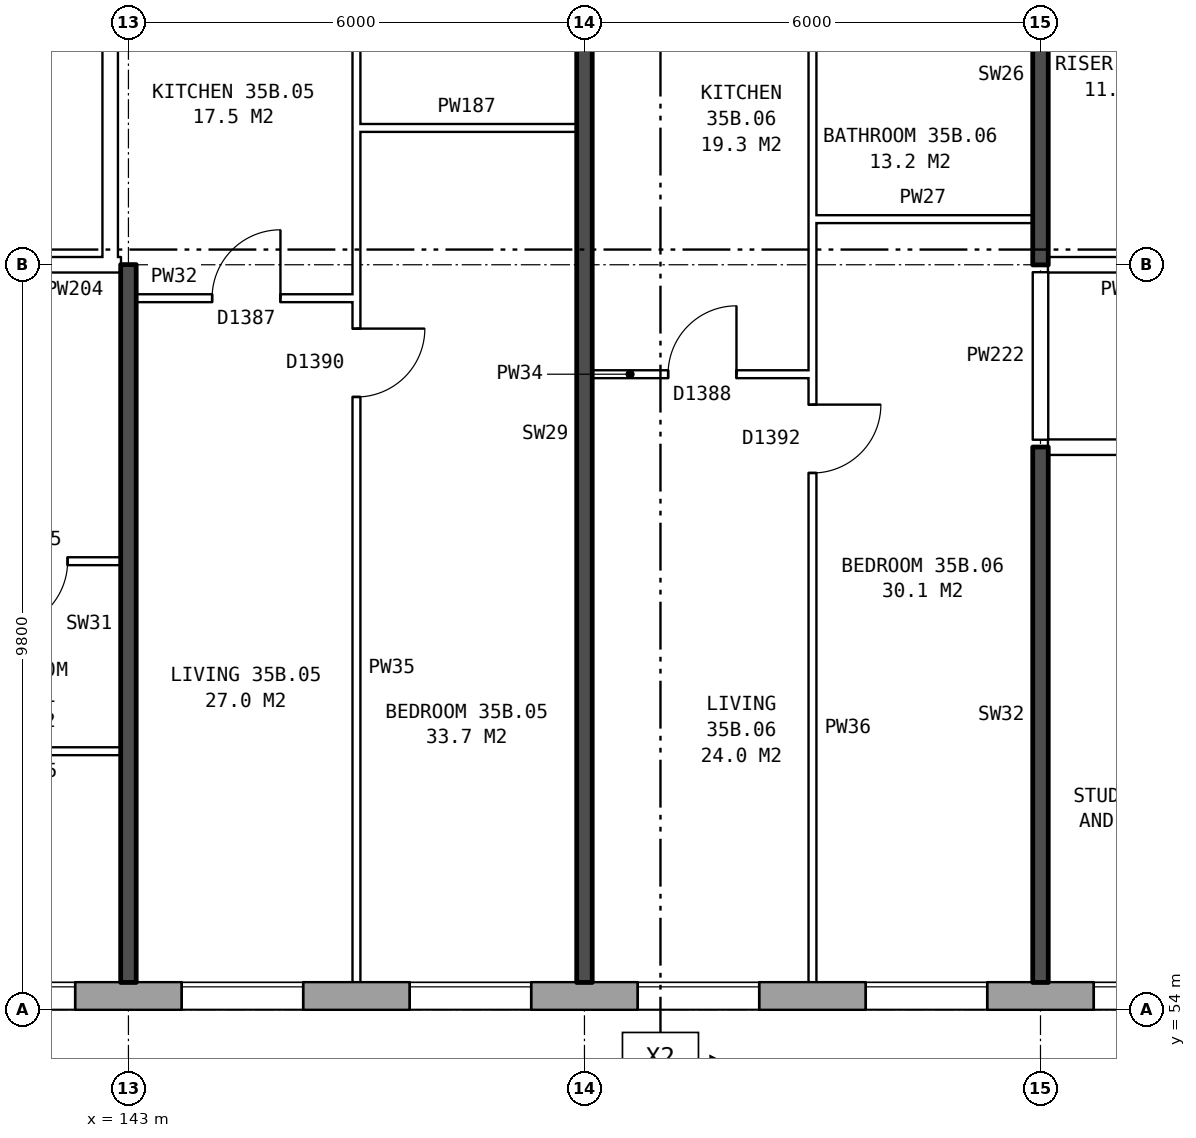
"""IFC4 building model, lengths in metres.
Left out: names, types, materials, properties, quantities, classifications, styles, units other than length and angle.
Written with IfcOpenShell. Run it as: python <this file> out.ifc"""

import sys

from ifc_helpers import new_model, si_unit, direction, frame, frame_2d, origin, place, context, subcontext, project, spatial, rectangle, extrude, element, fill, save


model = new_model("IFC4")
c1 = context("Model", 3, precision=1e-05, world=origin(), true_north=direction((0.0, 1.0)))
c2 = subcontext(c1, "Body", "Model", "MODEL_VIEW")
j1 = project(units=[si_unit("LENGTHUNIT", "METRE"), si_unit("PLANEANGLEUNIT", "RADIAN")], contexts=[c1])
p1 = place(None, origin())
s1 = spatial("IfcSite", under=j1, at=p1, CompositionType="ELEMENT")
p2 = place(p1, origin())
s2 = spatial("IfcBuilding", under=s1, at=p2, CompositionType="ELEMENT")
p3 = place(p2, frame((0.0, 0.0, 126.8)))
s3 = spatial("IfcBuildingStorey", under=s2, at=p3, CompositionType="ELEMENT", Elevation=126.8)
p4 = place(p3, frame((134.075, 54.18, 0.0), z_axis=(0.0, 0.0, 1.0), x_axis=(1.0, 0.0, 0.0)))
e1 = element("IfcWall", 1, at=p4, inside=s3, PredefinedType="STANDARD", context=c2, shape_type="SweptSolid", body=[
    extrude(rectangle(XDim=35.601, YDim=0.36, at=frame_2d((17.8, 0.0))), origin(), (0.0, 0.0, 1.0), 2.85),
])
p5 = place(p4, frame((0.625, 0.0, 0.8)))
e2 = element("IfcOpeningElement", 2, at=p5, cuts=e1, PredefinedType="OPENING", context=c2, shape_type="SweptSolid", body=[
    extrude(rectangle(XDim=1.6, YDim=1.8, at=frame_2d((0.8, 0.9))), frame((0.0, 0.19, 0.0), z_axis=(0.0, -1.0, 0.0), x_axis=(1.0, 0.0, 0.0)), (0.0, 0.0, 1.0), 0.38),
])
p6 = place(p4, frame((3.125, 0.0, 0.8)))
e3 = element("IfcOpeningElement", 3, at=p6, cuts=e1, PredefinedType="OPENING", context=c2, shape_type="SweptSolid", body=[
    extrude(rectangle(XDim=0.8, YDim=1.8, at=frame_2d((0.4, 0.9))), frame((0.0, 0.19, 0.0), z_axis=(0.0, -1.0, 0.0), x_axis=(1.0, 0.0, 0.0)), (0.0, 0.0, 1.0), 0.38),
])
p7 = place(p4, frame((6.625, 0.0, 0.8)))
e4 = element("IfcOpeningElement", 4, at=p7, cuts=e1, PredefinedType="OPENING", context=c2, shape_type="SweptSolid", body=[
    extrude(rectangle(XDim=1.6, YDim=1.8, at=frame_2d((0.8, 0.9))), frame((0.0, 0.19, 0.0), z_axis=(0.0, -1.0, 0.0), x_axis=(1.0, 0.0, 0.0)), (0.0, 0.0, 1.0), 0.38),
])
p8 = place(p4, frame((9.625, 0.0, 0.8)))
e5 = element("IfcOpeningElement", 5, at=p8, cuts=e1, PredefinedType="OPENING", context=c2, shape_type="SweptSolid", body=[
    extrude(rectangle(XDim=1.6, YDim=1.8, at=frame_2d((0.8, 0.9))), frame((0.0, 0.19, 0.0), z_axis=(0.0, -1.0, 0.0), x_axis=(1.0, 0.0, 0.0)), (0.0, 0.0, 1.0), 0.38),
])
p9 = place(p4, frame((12.625, 0.0, 0.8)))
e6 = element("IfcOpeningElement", 6, at=p9, cuts=e1, PredefinedType="OPENING", context=c2, shape_type="SweptSolid", body=[
    extrude(rectangle(XDim=1.6, YDim=1.8, at=frame_2d((0.8, 0.9))), frame((0.0, 0.19, 0.0), z_axis=(0.0, -1.0, 0.0), x_axis=(1.0, 0.0, 0.0)), (0.0, 0.0, 1.0), 0.38),
])
p10 = place(p4, frame((15.625, 0.0, 0.8)))
e7 = element("IfcOpeningElement", 7, at=p10, cuts=e1, PredefinedType="OPENING", context=c2, shape_type="SweptSolid", body=[
    extrude(rectangle(XDim=1.6, YDim=1.8, at=frame_2d((0.8, 0.9))), frame((0.0, 0.19, 0.0), z_axis=(0.0, -1.0, 0.0), x_axis=(1.0, 0.0, 0.0)), (0.0, 0.0, 1.0), 0.38),
])
p11 = place(p4, frame((18.625, 0.0, 0.8)))
e8 = element("IfcOpeningElement", 8, at=p11, cuts=e1, PredefinedType="OPENING", context=c2, shape_type="SweptSolid", body=[
    extrude(rectangle(XDim=1.6, YDim=1.8, at=frame_2d((0.8, 0.9))), frame((0.0, 0.19, 0.0), z_axis=(0.0, -1.0, 0.0), x_axis=(1.0, 0.0, 0.0)), (0.0, 0.0, 1.0), 0.38),
])
p12 = place(p4, frame((21.625, 0.0, 0.8)))
e9 = element("IfcOpeningElement", 9, at=p12, cuts=e1, PredefinedType="OPENING", context=c2, shape_type="SweptSolid", body=[
    extrude(rectangle(XDim=1.6, YDim=1.8, at=frame_2d((0.8, 0.9))), frame((0.0, 0.19, 0.0), z_axis=(0.0, -1.0, 0.0), x_axis=(1.0, 0.0, 0.0)), (0.0, 0.0, 1.0), 0.38),
])
p13 = place(p4, frame((24.625, 0.0, 0.8)))
e10 = element("IfcOpeningElement", 10, at=p13, cuts=e1, PredefinedType="OPENING", context=c2, shape_type="SweptSolid", body=[
    extrude(rectangle(XDim=1.6, YDim=1.8, at=frame_2d((0.8, 0.9))), frame((0.0, 0.19, 0.0), z_axis=(0.0, -1.0, 0.0), x_axis=(1.0, 0.0, 0.0)), (0.0, 0.0, 1.0), 0.38),
])
p14 = place(p4, frame((27.125, 0.0, 0.8)))
e11 = element("IfcOpeningElement", 11, at=p14, cuts=e1, PredefinedType="OPENING", context=c2, shape_type="SweptSolid", body=[
    extrude(rectangle(XDim=1.6, YDim=1.8, at=frame_2d((0.8, 0.9))), frame((0.0, 0.19, 0.0), z_axis=(0.0, -1.0, 0.0), x_axis=(1.0, 0.0, 0.0)), (0.0, 0.0, 1.0), 0.38),
])
p15 = place(p4, frame((29.025, 0.0, 0.8)))
e12 = element("IfcOpeningElement", 12, at=p15, cuts=e1, PredefinedType="OPENING", context=c2, shape_type="SweptSolid", body=[
    extrude(rectangle(XDim=0.6, YDim=0.9, at=frame_2d((0.3, 0.45))), frame((0.0, 0.19, 0.0), z_axis=(0.0, -1.0, 0.0), x_axis=(1.0, 0.0, 0.0)), (0.0, 0.0, 1.0), 0.38),
])
p16 = place(p4, frame((33.625, 0.0, 0.8)))
e13 = element("IfcOpeningElement", 13, at=p16, cuts=e1, PredefinedType="OPENING", context=c2, shape_type="SweptSolid", body=[
    extrude(rectangle(XDim=1.6, YDim=1.8, at=frame_2d((0.8, 0.9))), frame((0.0, 0.19, 0.0), z_axis=(0.0, -1.0, 0.0), x_axis=(1.0, 0.0, 0.0)), (0.0, 0.0, 1.0), 0.38),
])
p17 = place(p4, frame((4.225, 0.0, 1.6)))
e14 = element("IfcOpeningElement", 14, at=p17, cuts=e1, PredefinedType="OPENING", context=c2, shape_type="SweptSolid", body=[
    extrude(rectangle(XDim=0.6, YDim=0.9, at=frame_2d((0.3, 0.45))), frame((0.0, 0.19, 0.0), z_axis=(0.0, -1.0, 0.0), x_axis=(1.0, 0.0, 0.0)), (0.0, 0.0, 1.0), 0.38),
])
p18 = place(p4, frame((30.675, 0.0, 1.7)))
e15 = element("IfcOpeningElement", 15, at=p18, cuts=e1, PredefinedType="OPENING", context=c2, shape_type="SweptSolid", body=[
    extrude(rectangle(XDim=0.6, YDim=0.9, at=frame_2d((0.3, 0.45))), frame((0.0, 0.19, 0.0), z_axis=(0.0, -1.0, 0.0), x_axis=(1.0, 0.0, 0.0)), (0.0, 0.0, 1.0), 0.38),
])
p19 = place(p4, frame((31.575, 0.0, 0.8)))
e16 = element("IfcOpeningElement", 16, at=p19, cuts=e1, PredefinedType="OPENING", context=c2, shape_type="SweptSolid", body=[
    extrude(rectangle(XDim=1.0, YDim=1.8, at=frame_2d((0.5, 0.9))), frame((0.0, 0.19, 0.0), z_axis=(0.0, -1.0, 0.0), x_axis=(1.0, 0.0, 0.0)), (0.0, 0.0, 1.0), 0.38),
])
p20 = place(p3, frame((142.76, 63.9, 0.0), z_axis=(0.0, 0.0, 1.0), x_axis=(0.0, 1.0, 0.0)))
e17 = element("IfcWall", 17, at=p20, inside=s3, PredefinedType="PARTITIONING", context=c2, shape_type="SweptSolid", body=[
    extrude(rectangle(XDim=12.2, YDim=0.2, at=frame_2d((6.1, 0.0))), origin(), (0.0, 0.0, 1.0), 2.85),
])
p21 = place(p20, frame((5.1, 0.0, 0.0)))
e18 = element("IfcOpeningElement", 18, at=p21, cuts=e17, PredefinedType="OPENING", context=c2, shape_type="SweptSolid", body=[
    extrude(rectangle(XDim=2.0, YDim=2.1, at=frame_2d((1.0, 1.05))), frame((0.0, 0.11, 0.0), z_axis=(0.0, -1.0, 0.0), x_axis=(1.0, 0.0, 0.0)), (0.0, 0.0, 1.0), 0.22),
])
p22 = place(p3, frame((140.6, 57.4, 0.0), z_axis=(0.0, 0.0, 1.0), x_axis=(1.0, 0.0, 0.0)))
e19 = element("IfcWall", 19, at=p22, inside=s3, PredefinedType="PARTITIONING", context=c2, shape_type="SweptSolid", body=[
    extrude(rectangle(XDim=2.3, YDim=0.1, at=frame_2d((1.15, 0.0))), origin(), (0.0, 0.0, 1.0), 2.85),
])
p23 = place(p3, frame((137.1, 59.9, 0.0), z_axis=(0.0, 0.0, 1.0), x_axis=(1.0, 0.0, 0.0)))
e20 = element("IfcWall", 20, at=p23, inside=s3, PredefinedType="PARTITIONING", context=c2, shape_type="SweptSolid", body=[
    extrude(rectangle(XDim=5.8, YDim=0.1, at=frame_2d((2.9, 0.0))), origin(), (0.0, 0.0, 1.0), 2.85),
])
p24 = place(p23, frame((1.3, 0.0, 0.0)))
e21 = element("IfcOpeningElement", 21, at=p24, cuts=e20, PredefinedType="OPENING", context=c2, shape_type="SweptSolid", body=[
    extrude(rectangle(XDim=0.9, YDim=2.1, at=frame_2d((0.45, 1.05))), frame((0.0, 0.06, 0.0), z_axis=(0.0, -1.0, 0.0), x_axis=(1.0, 0.0, 0.0)), (0.0, 0.0, 1.0), 0.12),
])
p25 = place(p23, frame((4.2, 0.0, 0.0)))
e22 = element("IfcOpeningElement", 22, at=p25, cuts=e20, PredefinedType="OPENING", context=c2, shape_type="SweptSolid", body=[
    extrude(rectangle(XDim=0.9, YDim=2.1, at=frame_2d((0.45, 1.05))), frame((0.0, 0.06, 0.0), z_axis=(0.0, -1.0, 0.0), x_axis=(1.0, 0.0, 0.0)), (0.0, 0.0, 1.0), 0.12),
])
p26 = place(p3, frame((155.1, 61.4, 0.0), z_axis=(0.0, 0.0, 1.0), x_axis=(1.0, 0.0, 0.0)))
e23 = element("IfcWall", 23, at=p26, inside=s3, PredefinedType="PARTITIONING", context=c2, shape_type="SweptSolid", body=[
    extrude(rectangle(XDim=17.29, YDim=0.2, at=frame_2d((8.645, 0.0))), origin(), (0.0, 0.0, 1.0), 2.85),
])
p27 = place(p26, frame((1.45, 0.0, 0.0)))
e24 = element("IfcOpeningElement", 24, at=p27, cuts=e23, PredefinedType="OPENING", context=c2, shape_type="SweptSolid", body=[
    extrude(rectangle(XDim=1.0, YDim=2.1, at=frame_2d((0.5, 1.05))), frame((0.0, 0.11, 0.0), z_axis=(0.0, -1.0, 0.0), x_axis=(1.0, 0.0, 0.0)), (0.0, 0.0, 1.0), 0.22),
])
p28 = place(p26, frame((8.4, 0.0, 0.0)))
e25 = element("IfcOpeningElement", 25, at=p28, cuts=e23, PredefinedType="OPENING", context=c2, shape_type="SweptSolid", body=[
    extrude(rectangle(XDim=1.0, YDim=2.1, at=frame_2d((0.5, 1.05))), frame((0.0, 0.11, 0.0), z_axis=(0.0, -1.0, 0.0), x_axis=(1.0, 0.0, 0.0)), (0.0, 0.0, 1.0), 0.22),
])
p29 = place(p3, frame((149.1, 62.36, 0.0), z_axis=(0.0, 0.0, 1.0), x_axis=(1.0, 0.0, 0.0)))
e26 = element("IfcWall", 26, at=p29, inside=s3, PredefinedType="PARTITIONING", context=c2, shape_type="SweptSolid", body=[
    extrude(rectangle(XDim=2.9, YDim=0.1, at=frame_2d((1.45, 0.0))), origin(), (0.0, 0.0, 1.0), 2.85),
])
p30 = place(p29, frame((1.0, 0.0, 0.0)))
e27 = element("IfcOpeningElement", 27, at=p30, cuts=e26, PredefinedType="OPENING", context=c2, shape_type="SweptSolid", body=[
    extrude(rectangle(XDim=0.9, YDim=2.1, at=frame_2d((0.45, 1.05))), frame((0.0, 0.06, 0.0), z_axis=(0.0, -1.0, 0.0), x_axis=(1.0, 0.0, 0.0)), (0.0, 0.0, 1.0), 0.12),
])
p31 = place(p3, frame((143.1, 63.36, 0.0), z_axis=(0.0, 0.0, 1.0), x_axis=(1.0, 0.0, 0.0)))
e28 = element("IfcWall", 28, at=p31, inside=s3, PredefinedType="PARTITIONING", context=c2, shape_type="SweptSolid", body=[
    extrude(rectangle(XDim=2.9, YDim=0.1, at=frame_2d((1.45, 0.0))), origin(), (0.0, 0.0, 1.0), 2.85),
])
p32 = place(p31, frame((1.0, 0.0, 0.0)))
e29 = element("IfcOpeningElement", 29, at=p32, cuts=e28, PredefinedType="OPENING", context=c2, shape_type="SweptSolid", body=[
    extrude(rectangle(XDim=0.9, YDim=2.1, at=frame_2d((0.45, 1.05))), frame((0.0, 0.06, 0.0), z_axis=(0.0, -1.0, 0.0), x_axis=(1.0, 0.0, 0.0)), (0.0, 0.0, 1.0), 0.12),
])
p33 = place(p3, frame((139.76, 63.8, 0.0), z_axis=(0.0, 0.0, 1.0), x_axis=(1.0, 0.0, 0.0)))
e30 = element("IfcWall", 30, at=p33, inside=s3, PredefinedType="PARTITIONING", context=c2, shape_type="SweptSolid", body=[
    extrude(rectangle(XDim=3.0, YDim=0.2, at=frame_2d((1.5, 0.0))), origin(), (0.0, 0.0, 1.0), 2.85),
])
p34 = place(p33, frame((1.0, 0.0, 0.0)))
e31 = element("IfcOpeningElement", 31, at=p34, cuts=e30, PredefinedType="OPENING", context=c2, shape_type="SweptSolid", body=[
    extrude(rectangle(XDim=1.0, YDim=2.1, at=frame_2d((0.5, 1.05))), frame((0.0, 0.11, 0.0), z_axis=(0.0, -1.0, 0.0), x_axis=(1.0, 0.0, 0.0)), (0.0, 0.0, 1.0), 0.22),
])
p35 = place(p3, frame((142.76, 63.8, 0.0), z_axis=(0.0, 0.0, 1.0), x_axis=(1.0, 0.0, 0.0)))
e32 = element("IfcWall", 32, at=p35, inside=s3, PredefinedType="PARTITIONING", context=c2, shape_type="SweptSolid", body=[
    extrude(rectangle(XDim=0.14, YDim=0.2, at=frame_2d((0.07, 0.0))), origin(), (0.0, 0.0, 1.0), 2.85),
])
p36 = place(p3, frame((155.1, 63.8, 0.0), z_axis=(0.0, 0.0, 1.0), x_axis=(1.0, 0.0, 0.0)))
e33 = element("IfcWall", 33, at=p36, inside=s3, PredefinedType="PARTITIONING", context=c2, shape_type="SweptSolid", body=[
    extrude(rectangle(XDim=2.14, YDim=0.2, at=frame_2d((1.07, 0.0))), origin(), (0.0, 0.0, 1.0), 2.85),
])
for number, where, z_axis, x_axis in (
    (34, (152.0, 64.4, 0.0), (0.0, 0.0, 1.0), (1.0, 0.0, 0.0)),
    (35, (146.0, 65.6, 0.0), (0.0, 0.0, 1.0), (1.0, 0.0, 0.0)),
):
    element("IfcWall", number, at=place(p3, frame(where, z_axis=z_axis, x_axis=x_axis)), inside=s3, PredefinedType="PARTITIONING", context=c2, shape_type="SweptSolid", body=[
        extrude(rectangle(XDim=2.9, YDim=0.1, at=frame_2d((1.45, 0.0))), origin(), (0.0, 0.0, 1.0), 2.85),
    ])
p37 = place(p3, frame((143.0, 54.36, 0.0), z_axis=(0.0, 0.0, 1.0), x_axis=(0.0, 1.0, 0.0)))
e36 = element("IfcWall", 36, at=p37, inside=s3, PredefinedType="SOLIDWALL", context=c2, shape_type="SweptSolid", body=[
    extrude(rectangle(XDim=9.44, YDim=0.2, at=frame_2d((4.72, 0.0))), origin(), (0.0, 0.0, 1.0), 2.85),
])
p38 = place(p3, frame((146.0, 54.36, 0.0), z_axis=(0.0, 0.0, 1.0), x_axis=(0.0, 1.0, 0.0)))
e37 = element("IfcWall", 37, at=p38, inside=s3, PredefinedType="PARTITIONING", context=c2, shape_type="SweptSolid", body=[
    extrude(rectangle(XDim=14.34, YDim=0.1, at=frame_2d((7.17, 0.0))), origin(), (0.0, 0.0, 1.0), 2.85),
])
p39 = place(p38, frame((7.7, 0.0, 0.0)))
e38 = element("IfcOpeningElement", 38, at=p39, cuts=e37, PredefinedType="OPENING", context=c2, shape_type="SweptSolid", body=[
    extrude(rectangle(XDim=0.9, YDim=2.1, at=frame_2d((0.45, 1.05))), frame((0.0, 0.06, 0.0), z_axis=(0.0, -1.0, 0.0), x_axis=(1.0, 0.0, 0.0)), (0.0, 0.0, 1.0), 0.12),
])
p40 = place(p38, frame((13.04, 0.0, 0.0)))
e39 = element("IfcOpeningElement", 39, at=p40, cuts=e37, PredefinedType="OPENING", context=c2, shape_type="SweptSolid", body=[
    extrude(rectangle(XDim=0.9, YDim=2.1, at=frame_2d((0.45, 1.05))), frame((0.0, 0.06, 0.0), z_axis=(0.0, -1.0, 0.0), x_axis=(1.0, 0.0, 0.0)), (0.0, 0.0, 1.0), 0.12),
])
p41 = place(p3, frame((149.0, 54.36, 0.0), z_axis=(0.0, 0.0, 1.0), x_axis=(0.0, 1.0, 0.0)))
e40 = element("IfcWall", 40, at=p41, inside=s3, PredefinedType="SOLIDWALL", context=c2, shape_type="SweptSolid", body=[
    extrude(rectangle(XDim=14.44, YDim=0.2, at=frame_2d((7.22, 0.0))), origin(), (0.0, 0.0, 1.0), 2.85),
])
p42 = place(p3, frame((152.0, 54.36, 0.0), z_axis=(0.0, 0.0, 1.0), x_axis=(0.0, 1.0, 0.0)))
e41 = element("IfcWall", 41, at=p42, inside=s3, PredefinedType="PARTITIONING", context=c2, shape_type="SweptSolid", body=[
    extrude(rectangle(XDim=14.34, YDim=0.1, at=frame_2d((7.17, 0.0))), origin(), (0.0, 0.0, 1.0), 2.85),
])
p43 = place(p42, frame((6.7, 0.0, 0.0)))
e42 = element("IfcOpeningElement", 42, at=p43, cuts=e41, PredefinedType="OPENING", context=c2, shape_type="SweptSolid", body=[
    extrude(rectangle(XDim=0.9, YDim=2.1, at=frame_2d((0.45, 1.05))), frame((0.0, 0.06, 0.0), z_axis=(0.0, -1.0, 0.0), x_axis=(1.0, 0.0, 0.0)), (0.0, 0.0, 1.0), 0.12),
])
p44 = place(p42, frame((13.04, 0.0, 0.0)))
e43 = element("IfcOpeningElement", 43, at=p44, cuts=e41, PredefinedType="OPENING", context=c2, shape_type="SweptSolid", body=[
    extrude(rectangle(XDim=0.9, YDim=2.1, at=frame_2d((0.45, 1.05))), frame((0.0, 0.06, 0.0), z_axis=(0.0, -1.0, 0.0), x_axis=(1.0, 0.0, 0.0)), (0.0, 0.0, 1.0), 0.12),
])
p45 = place(p3, frame((155.0, 54.36, 0.0), z_axis=(0.0, 0.0, 1.0), x_axis=(0.0, 1.0, 0.0)))
e44 = element("IfcWall", 44, at=p45, inside=s3, PredefinedType="SOLIDWALL", context=c2, shape_type="SweptSolid", body=[
    extrude(rectangle(XDim=7.04, YDim=0.2, at=frame_2d((3.52, 0.0))), origin(), (0.0, 0.0, 1.0), 2.85),
])
p46 = place(p3, frame((155.0, 61.5, 0.0), z_axis=(0.0, 0.0, 1.0), x_axis=(0.0, 1.0, 0.0)))
e45 = element("IfcWall", 45, at=p46, inside=s3, PredefinedType="PARTITIONING", context=c2, shape_type="SweptSolid", body=[
    extrude(rectangle(XDim=2.2, YDim=0.2, at=frame_2d((1.1, 0.0))), origin(), (0.0, 0.0, 1.0), 2.85),
])
p47 = place(p3, frame((155.0, 63.8, 0.0), z_axis=(0.0, 0.0, 1.0), x_axis=(0.0, 1.0, 0.0)))
e46 = element("IfcWall", 46, at=p47, inside=s3, PredefinedType="SOLIDWALL", context=c2, shape_type="SweptSolid", body=[
    extrude(rectangle(XDim=5.0, YDim=0.2, at=frame_2d((2.5, 0.0))), origin(), (0.0, 0.0, 1.0), 2.85),
])
p48 = place(p7, origin())
e47 = element("IfcWindow", 47, at=p48, inside=s3, PartitioningType="SINGLE_PANEL", PredefinedType="WINDOW", context=c2, shape_type="SweptSolid", body=[
    extrude(rectangle(XDim=1.6, YDim=1.8, at=frame_2d((0.8, 0.9))), frame((0.0, 0.15, 0.0), z_axis=(0.0, -1.0, 0.0), x_axis=(1.0, 0.0, 0.0)), (0.0, 0.0, 1.0), 0.06),
])
fill(e4, e47)
p49 = place(p8, origin())
e48 = element("IfcWindow", 48, at=p49, inside=s3, PartitioningType="SINGLE_PANEL", PredefinedType="WINDOW", context=c2, shape_type="SweptSolid", body=[
    extrude(rectangle(XDim=1.6, YDim=1.8, at=frame_2d((0.8, 0.9))), frame((0.0, 0.15, 0.0), z_axis=(0.0, -1.0, 0.0), x_axis=(1.0, 0.0, 0.0)), (0.0, 0.0, 1.0), 0.06),
])
fill(e5, e48)
p50 = place(p9, origin())
e49 = element("IfcWindow", 49, at=p50, inside=s3, PartitioningType="SINGLE_PANEL", PredefinedType="WINDOW", context=c2, shape_type="SweptSolid", body=[
    extrude(rectangle(XDim=1.6, YDim=1.8, at=frame_2d((0.8, 0.9))), frame((0.0, 0.15, 0.0), z_axis=(0.0, -1.0, 0.0), x_axis=(1.0, 0.0, 0.0)), (0.0, 0.0, 1.0), 0.06),
])
fill(e6, e49)
p51 = place(p10, origin())
e50 = element("IfcWindow", 50, at=p51, inside=s3, PartitioningType="SINGLE_PANEL", PredefinedType="WINDOW", context=c2, shape_type="SweptSolid", body=[
    extrude(rectangle(XDim=1.6, YDim=1.8, at=frame_2d((0.8, 0.9))), frame((0.0, 0.15, 0.0), z_axis=(0.0, -1.0, 0.0), x_axis=(1.0, 0.0, 0.0)), (0.0, 0.0, 1.0), 0.06),
])
fill(e7, e50)
p52 = place(p11, origin())
e51 = element("IfcWindow", 51, at=p52, inside=s3, PartitioningType="SINGLE_PANEL", PredefinedType="WINDOW", context=c2, shape_type="SweptSolid", body=[
    extrude(rectangle(XDim=1.6, YDim=1.8, at=frame_2d((0.8, 0.9))), frame((0.0, 0.15, 0.0), z_axis=(0.0, -1.0, 0.0), x_axis=(1.0, 0.0, 0.0)), (0.0, 0.0, 1.0), 0.06),
])
fill(e8, e51)
p53 = place(p12, origin())
e52 = element("IfcWindow", 52, at=p53, inside=s3, PartitioningType="SINGLE_PANEL", PredefinedType="WINDOW", context=c2, shape_type="SweptSolid", body=[
    extrude(rectangle(XDim=1.6, YDim=1.8, at=frame_2d((0.8, 0.9))), frame((0.0, 0.15, 0.0), z_axis=(0.0, -1.0, 0.0), x_axis=(1.0, 0.0, 0.0)), (0.0, 0.0, 1.0), 0.06),
])
fill(e9, e52)
p54 = place(p25, frame((0.9, 0.0, 0.0), z_axis=(0.0, 0.0, 1.0), x_axis=(-1.0, 0.0, 0.0)))
e53 = element("IfcDoor", 53, at=p54, inside=s3, OperationType="SINGLE_SWING_RIGHT", PredefinedType="DOOR", context=c2, shape_type="SweptSolid", body=[
    extrude(rectangle(XDim=0.9, YDim=2.1, at=frame_2d((0.45, 1.05))), frame((0.0, 0.025, 0.0), z_axis=(0.0, -1.0, 0.0), x_axis=(1.0, 0.0, 0.0)), (0.0, 0.0, 1.0), 0.05),
])
fill(e22, e53)
p55 = place(p39, frame((0.9, 0.0, 0.0), z_axis=(0.0, 0.0, 1.0), x_axis=(-1.0, 0.0, 0.0)))
e54 = element("IfcDoor", 54, at=p55, inside=s3, OperationType="SINGLE_SWING_LEFT", PredefinedType="DOOR", context=c2, shape_type="SweptSolid", body=[
    extrude(rectangle(XDim=0.9, YDim=2.1, at=frame_2d((0.45, 1.05))), frame((0.0, 0.025, 0.0), z_axis=(0.0, -1.0, 0.0), x_axis=(1.0, 0.0, 0.0)), (0.0, 0.0, 1.0), 0.05),
])
fill(e38, e54)
p56 = place(p32, origin())
e55 = element("IfcDoor", 55, at=p56, inside=s3, OperationType="SINGLE_SWING_RIGHT", PredefinedType="DOOR", context=c2, shape_type="SweptSolid", body=[
    extrude(rectangle(XDim=0.9, YDim=2.1, at=frame_2d((0.45, 1.05))), frame((0.0, 0.025, 0.0), z_axis=(0.0, -1.0, 0.0), x_axis=(1.0, 0.0, 0.0)), (0.0, 0.0, 1.0), 0.05),
])
fill(e29, e55)
p57 = place(p43, frame((0.9, 0.0, 0.0), z_axis=(0.0, 0.0, 1.0), x_axis=(-1.0, 0.0, 0.0)))
e56 = element("IfcDoor", 56, at=p57, inside=s3, OperationType="SINGLE_SWING_LEFT", PredefinedType="DOOR", context=c2, shape_type="SweptSolid", body=[
    extrude(rectangle(XDim=0.9, YDim=2.1, at=frame_2d((0.45, 1.05))), frame((0.0, 0.025, 0.0), z_axis=(0.0, -1.0, 0.0), x_axis=(1.0, 0.0, 0.0)), (0.0, 0.0, 1.0), 0.05),
])
fill(e42, e56)
p58 = place(p30, origin())
e57 = element("IfcDoor", 57, at=p58, inside=s3, OperationType="SINGLE_SWING_RIGHT", PredefinedType="DOOR", context=c2, shape_type="SweptSolid", body=[
    extrude(rectangle(XDim=0.9, YDim=2.1, at=frame_2d((0.45, 1.05))), frame((0.0, 0.025, 0.0), z_axis=(0.0, -1.0, 0.0), x_axis=(1.0, 0.0, 0.0)), (0.0, 0.0, 1.0), 0.05),
])
fill(e27, e57)
save(model, sys.argv[1])
